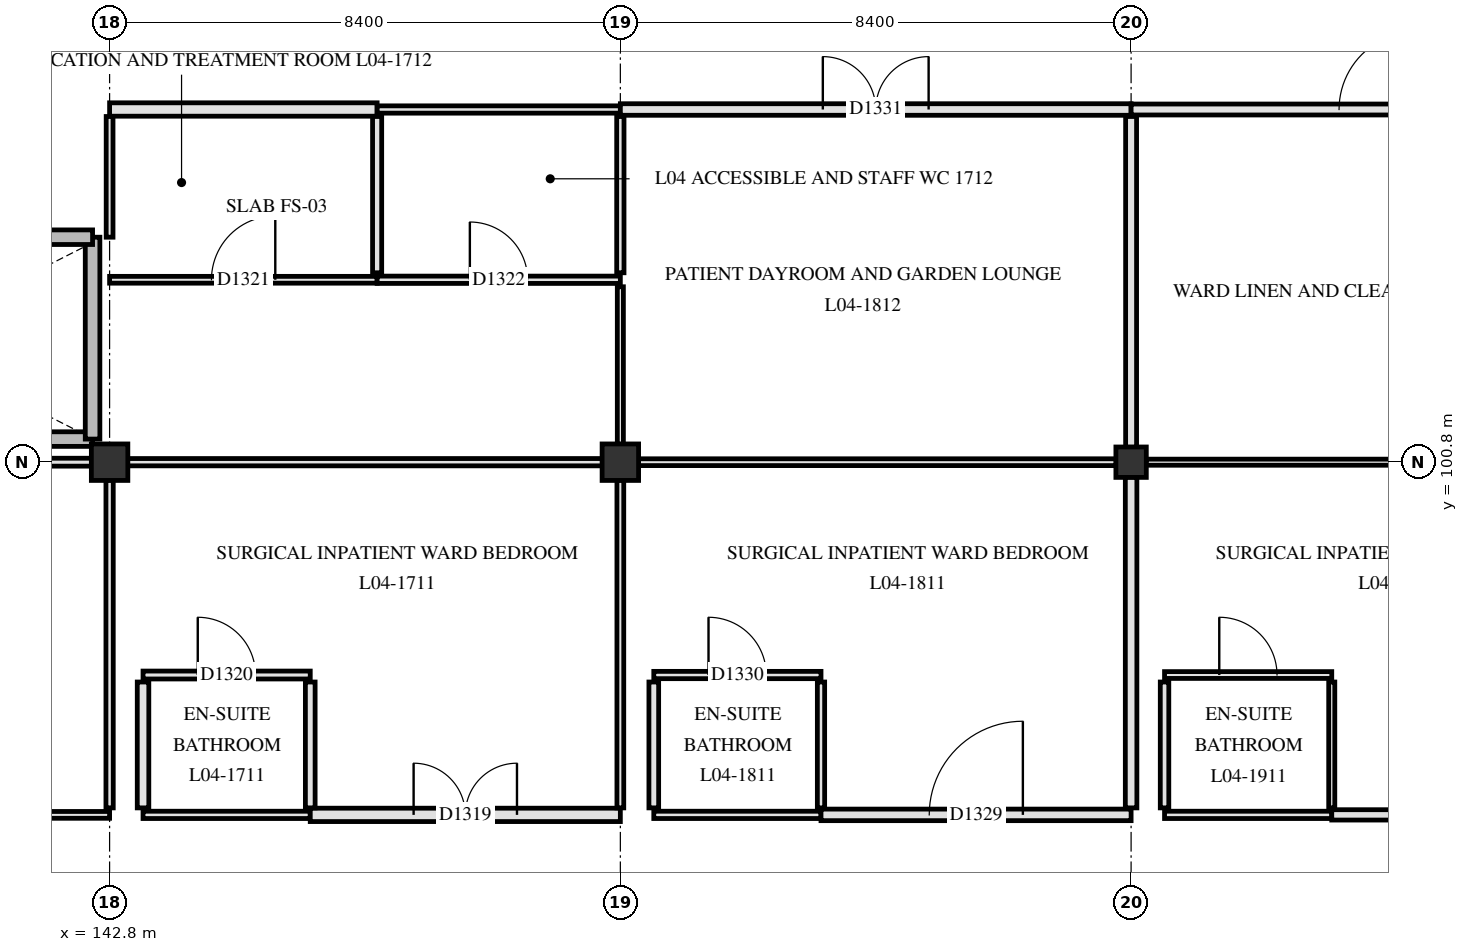
"""IFC4 building model, lengths in metres.
Left out: names, types, materials, properties, quantities, classifications, styles, units other than length and angle.
Written with IfcOpenShell. Run it as: python <this file> out.ifc"""

import sys

from ifc_helpers import new_model, si_unit, direction, frame, frame_2d, origin, origin_2d, place, context, subcontext, project, spatial, rectangle, extrude, element, fill, save


model = new_model("IFC4")
c1 = context("Model", 3, precision=1e-05, world=origin(), true_north=direction((0.0, 1.0)))
c2 = subcontext(c1, "Body", "Model", "MODEL_VIEW")
j1 = project(units=[si_unit("LENGTHUNIT", "METRE"), si_unit("PLANEANGLEUNIT", "RADIAN")], contexts=[c1])
p1 = place(None, origin())
s1 = spatial("IfcSite", under=j1, at=p1, CompositionType="ELEMENT")
p2 = place(p1, origin())
s2 = spatial("IfcBuilding", under=s1, at=p2, CompositionType="ELEMENT")
p3 = place(p2, frame((0.0, 0.0, 18.6)))
s3 = spatial("IfcBuildingStorey", under=s2, at=p3, CompositionType="ELEMENT", Elevation=18.6)
for number, where, z_axis, x_axis in (
    (1, (142.8, 100.8, 0.0), (0.0, 0.0, 1.0), (1.0, 0.0, 0.0)),
    (2, (151.2, 100.8, 0.0), (0.0, 0.0, 1.0), (1.0, 0.0, 0.0)),
):
    element("IfcColumn", number, at=place(p3, frame(where, z_axis=z_axis, x_axis=x_axis)), inside=s3, PredefinedType="COLUMN", context=c2, shape_type="SweptSolid", body=[
        extrude(rectangle(XDim=0.6, YDim=0.6, at=origin_2d()), origin(), (0.0, 0.0, 1.0), 3.9),
    ])
p4 = place(p3, frame((159.6, 100.8, 0.0), z_axis=(0.0, 0.0, 1.0), x_axis=(1.0, 0.0, 0.0)))
e3 = element("IfcColumn", 3, at=p4, inside=s3, PredefinedType="COLUMN", context=c2, shape_type="SweptSolid", body=[
    extrude(rectangle(XDim=0.5, YDim=0.5, at=origin_2d()), origin(), (0.0, 0.0, 1.0), 3.9),
])
p5 = place(p3, frame((134.7, 101.18, 0.0), z_axis=(0.0, 0.0, 1.0), x_axis=(1.0, 0.0, 0.0)))
e4 = element("IfcWall", 4, at=p5, inside=s3, PredefinedType="SHEAR", context=c2, shape_type="SweptSolid", body=[
    extrude(rectangle(XDim=7.82, YDim=0.24, at=frame_2d((3.91, 0.0))), origin(), (0.0, 0.0, 1.0), 3.62),
])
p6 = place(p3, frame((142.52, 101.18, 0.0), z_axis=(0.0, 0.0, 1.0), x_axis=(0.0, 1.0, 0.0)))
e5 = element("IfcWall", 5, at=p6, inside=s3, PredefinedType="SHEAR", context=c2, shape_type="SweptSolid", body=[
    extrude(rectangle(XDim=3.32, YDim=0.24, at=frame_2d((1.66, 0.0))), origin(), (0.0, 0.0, 1.0), 3.62),
])
p7 = place(p3, frame((134.7, 104.5, 0.0), z_axis=(0.0, 0.0, 1.0), x_axis=(1.0, 0.0, 0.0)))
e6 = element("IfcWall", 6, at=p7, inside=s3, PredefinedType="SHEAR", context=c2, shape_type="SweptSolid", body=[
    extrude(rectangle(XDim=7.82, YDim=0.24, at=frame_2d((3.91, 0.0))), origin(), (0.0, 0.0, 1.0), 3.62),
])
p8 = place(p7, frame((0.25, 0.0, 0.0)))
e7 = element("IfcOpeningElement", 7, at=p8, cuts=e6, PredefinedType="OPENING", context=c2, shape_type="SweptSolid", body=[
    extrude(rectangle(XDim=1.45, YDim=2.2, at=frame_2d((0.725, 1.1))), frame((0.0, 0.13, 0.0), z_axis=(0.0, -1.0, 0.0), x_axis=(1.0, 0.0, 0.0)), (0.0, 0.0, 1.0), 0.26),
])
p9 = place(p3, frame((137.7, 95.0, 0.0), z_axis=(0.0, 0.0, 1.0), x_axis=(1.0, 0.0, 0.0)))
e8 = element("IfcWall", 8, at=p9, inside=s3, PredefinedType="PARTITIONING", context=c2, shape_type="SweptSolid", body=[
    extrude(rectangle(XDim=5.1, YDim=0.112, at=frame_2d((2.55, 0.0))), origin(), (0.0, 0.0, 1.0), 3.26),
])
p10 = place(p9, frame((1.85, 0.0, 0.0)))
e9 = element("IfcOpeningElement", 9, at=p10, cuts=e8, PredefinedType="OPENING", context=c2, shape_type="SweptSolid", body=[
    extrude(rectangle(XDim=1.4, YDim=2.2, at=frame_2d((0.7, 1.1))), frame((0.0, 0.066, 0.0), z_axis=(0.0, -1.0, 0.0), x_axis=(1.0, 0.0, 0.0)), (0.0, 0.0, 1.0), 0.132),
])
p11 = place(p3, frame((143.35, 95.0, 0.0), z_axis=(0.0, 0.0, 1.0), x_axis=(1.0, 0.0, 0.0)))
e10 = element("IfcWall", 10, at=p11, inside=s3, PredefinedType="PARTITIONING", context=c2, shape_type="SweptSolid", body=[
    extrude(rectangle(XDim=2.75, YDim=0.12, at=frame_2d((1.375, 0.0))), origin(), (0.0, 0.0, 1.0), 3.61),
])
p12 = place(p3, frame((146.1, 95.0, 0.0), z_axis=(0.0, 0.0, 1.0), x_axis=(1.0, 0.0, 0.0)))
e11 = element("IfcWall", 11, at=p12, inside=s3, PredefinedType="PARTITIONING", context=c2, shape_type="SweptSolid", body=[
    extrude(rectangle(XDim=5.1, YDim=0.22, at=frame_2d((2.55, 0.0))), origin(), (0.0, 0.0, 1.0), 3.26),
])
p13 = place(p12, frame((1.7, 0.0, 0.0)))
e12 = element("IfcOpeningElement", 12, at=p13, cuts=e11, PredefinedType="OPENING", context=c2, shape_type="SweptSolid", body=[
    extrude(rectangle(XDim=1.7, YDim=2.25, at=frame_2d((0.85, 1.125))), frame((0.0, 0.12, 0.0), z_axis=(0.0, -1.0, 0.0), x_axis=(1.0, 0.0, 0.0)), (0.0, 0.0, 1.0), 0.24),
])
p14 = place(p3, frame((151.75, 95.0, 0.0), z_axis=(0.0, 0.0, 1.0), x_axis=(1.0, 0.0, 0.0)))
e13 = element("IfcWall", 13, at=p14, inside=s3, PredefinedType="PARTITIONING", context=c2, shape_type="SweptSolid", body=[
    extrude(rectangle(XDim=2.75, YDim=0.12, at=frame_2d((1.375, 0.0))), origin(), (0.0, 0.0, 1.0), 3.61),
])
p15 = place(p3, frame((154.5, 95.0, 0.0), z_axis=(0.0, 0.0, 1.0), x_axis=(1.0, 0.0, 0.0)))
e14 = element("IfcWall", 14, at=p15, inside=s3, PredefinedType="PARTITIONING", context=c2, shape_type="SweptSolid", body=[
    extrude(rectangle(XDim=5.1, YDim=0.19, at=frame_2d((2.55, 0.0))), origin(), (0.0, 0.0, 1.0), 3.25),
])
p16 = place(p15, frame((1.78, 0.0, 0.0)))
e15 = element("IfcOpeningElement", 15, at=p16, cuts=e14, PredefinedType="OPENING", context=c2, shape_type="SweptSolid", body=[
    extrude(rectangle(XDim=1.54, YDim=2.24, at=frame_2d((0.77, 1.12))), frame((0.0, 0.105, 0.0), z_axis=(0.0, -1.0, 0.0), x_axis=(1.0, 0.0, 0.0)), (0.0, 0.0, 1.0), 0.21),
])
p17 = place(p3, frame((160.15, 95.0, 0.0), z_axis=(0.0, 0.0, 1.0), x_axis=(1.0, 0.0, 0.0)))
e16 = element("IfcWall", 16, at=p17, inside=s3, PredefinedType="PARTITIONING", context=c2, shape_type="SweptSolid", body=[
    extrude(rectangle(XDim=2.75, YDim=0.12, at=frame_2d((1.375, 0.0))), origin(), (0.0, 0.0, 1.0), 3.61),
])
p18 = place(p3, frame((162.9, 95.0, 0.0), z_axis=(0.0, 0.0, 1.0), x_axis=(1.0, 0.0, 0.0)))
e17 = element("IfcWall", 17, at=p18, inside=s3, PredefinedType="PARTITIONING", context=c2, shape_type="SweptSolid", body=[
    extrude(rectangle(XDim=4.82, YDim=0.17, at=frame_2d((2.41, 0.0))), origin(), (0.0, 0.0, 1.0), 3.61),
])
p19 = place(p18, frame((1.85, 0.0, 0.0)))
e18 = element("IfcOpeningElement", 18, at=p19, cuts=e17, PredefinedType="OPENING", context=c2, shape_type="SweptSolid", body=[
    extrude(rectangle(XDim=1.12, YDim=2.18, at=frame_2d((0.56, 1.09))), frame((0.0, 0.095, 0.0), z_axis=(0.0, -1.0, 0.0), x_axis=(1.0, 0.0, 0.0)), (0.0, 0.0, 1.0), 0.19),
])
p20 = place(p3, frame((143.35, 97.3, 0.0), z_axis=(0.0, 0.0, 1.0), x_axis=(1.0, 0.0, 0.0)))
e19 = element("IfcWall", 19, at=p20, inside=s3, PredefinedType="PARTITIONING", context=c2, shape_type="SweptSolid", body=[
    extrude(rectangle(XDim=2.75, YDim=0.13, at=frame_2d((1.375, 0.0))), origin(), (0.0, 0.0, 1.0), 3.61),
])
p21 = place(p20, frame((0.9, 0.0, 0.0)))
e20 = element("IfcOpeningElement", 20, at=p21, cuts=e19, PredefinedType="OPENING", context=c2, shape_type="SweptSolid", body=[
    extrude(rectangle(XDim=0.95, YDim=2.1, at=frame_2d((0.475, 1.05))), frame((0.0, 0.075, 0.0), z_axis=(0.0, -1.0, 0.0), x_axis=(1.0, 0.0, 0.0)), (0.0, 0.0, 1.0), 0.15),
])
p22 = place(p3, frame((151.75, 97.3, 0.0), z_axis=(0.0, 0.0, 1.0), x_axis=(1.0, 0.0, 0.0)))
e21 = element("IfcWall", 21, at=p22, inside=s3, PredefinedType="PARTITIONING", context=c2, shape_type="SweptSolid", body=[
    extrude(rectangle(XDim=2.75, YDim=0.12, at=frame_2d((1.375, 0.0))), origin(), (0.0, 0.0, 1.0), 3.61),
])
p23 = place(p22, frame((0.9, 0.0, 0.0)))
e22 = element("IfcOpeningElement", 22, at=p23, cuts=e21, PredefinedType="OPENING", context=c2, shape_type="SweptSolid", body=[
    extrude(rectangle(XDim=0.95, YDim=2.1, at=frame_2d((0.475, 1.05))), frame((0.0, 0.07, 0.0), z_axis=(0.0, -1.0, 0.0), x_axis=(1.0, 0.0, 0.0)), (0.0, 0.0, 1.0), 0.14),
])
p24 = place(p3, frame((160.15, 97.3, 0.0), z_axis=(0.0, 0.0, 1.0), x_axis=(1.0, 0.0, 0.0)))
e23 = element("IfcWall", 23, at=p24, inside=s3, PredefinedType="PARTITIONING", context=c2, shape_type="SweptSolid", body=[
    extrude(rectangle(XDim=2.75, YDim=0.112, at=frame_2d((1.375, 0.0))), origin(), (0.0, 0.0, 1.0), 3.61),
])
p25 = place(p24, frame((0.9, 0.0, 0.0)))
e24 = element("IfcOpeningElement", 24, at=p25, cuts=e23, PredefinedType="OPENING", context=c2, shape_type="SweptSolid", body=[
    extrude(rectangle(XDim=0.95, YDim=2.1, at=frame_2d((0.475, 1.05))), frame((0.0, 0.066, 0.0), z_axis=(0.0, -1.0, 0.0), x_axis=(1.0, 0.0, 0.0)), (0.0, 0.0, 1.0), 0.132),
])
p26 = place(p3, frame((137.0, 100.8, 0.0), z_axis=(0.0, 0.0, 1.0), x_axis=(1.0, 0.0, 0.0)))
e25 = element("IfcWall", 25, at=p26, inside=s3, PredefinedType="PARTITIONING", context=c2, shape_type="SweptSolid", body=[
    extrude(rectangle(XDim=5.505, YDim=0.13, at=frame_2d((2.752, 0.0))), origin(), (0.0, 0.0, 1.0), 3.16),
])
p27 = place(p3, frame((143.095, 100.8, 0.0), z_axis=(0.0, 0.0, 1.0), x_axis=(1.0, 0.0, 0.0)))
e26 = element("IfcWall", 26, at=p27, inside=s3, PredefinedType="PARTITIONING", context=c2, shape_type="SweptSolid", body=[
    extrude(rectangle(XDim=7.81, YDim=0.12, at=frame_2d((3.905, 0.0))), origin(), (0.0, 0.0, 1.0), 3.16),
])
p28 = place(p3, frame((151.495, 100.8, 0.0), z_axis=(0.0, 0.0, 1.0), x_axis=(1.0, 0.0, 0.0)))
e27 = element("IfcWall", 27, at=p28, inside=s3, PredefinedType="PARTITIONING", context=c2, shape_type="SweptSolid", body=[
    extrude(rectangle(XDim=7.86, YDim=0.112, at=frame_2d((3.93, 0.0))), origin(), (0.0, 0.0, 1.0), 3.16),
])
p29 = place(p3, frame((159.845, 100.8, 0.0), z_axis=(0.0, 0.0, 1.0), x_axis=(1.0, 0.0, 0.0)))
e28 = element("IfcWall", 28, at=p29, inside=s3, PredefinedType="PARTITIONING", context=c2, shape_type="SweptSolid", body=[
    extrude(rectangle(XDim=7.91, YDim=0.1, at=frame_2d((3.955, 0.0))), origin(), (0.0, 0.0, 1.0), 3.15),
])
p30 = place(p3, frame((142.8, 103.8, 0.0), z_axis=(0.0, 0.0, 1.0), x_axis=(1.0, 0.0, 0.0)))
e29 = element("IfcWall", 29, at=p30, inside=s3, PredefinedType="PARTITIONING", context=c2, shape_type="SweptSolid", body=[
    extrude(rectangle(XDim=4.4, YDim=0.112, at=frame_2d((2.2, 0.0))), origin(), (0.0, 0.0, 1.0), 3.26),
])
p31 = place(p30, frame((1.675, 0.0, 0.0)))
e30 = element("IfcOpeningElement", 30, at=p31, cuts=e29, PredefinedType="OPENING", context=c2, shape_type="SweptSolid", body=[
    extrude(rectangle(XDim=1.05, YDim=2.15, at=frame_2d((0.525, 1.075))), frame((0.0, 0.066, 0.0), z_axis=(0.0, -1.0, 0.0), x_axis=(1.0, 0.0, 0.0)), (0.0, 0.0, 1.0), 0.132),
])
p32 = place(p3, frame((147.2, 103.8, 0.0), z_axis=(0.0, 0.0, 1.0), x_axis=(1.0, 0.0, 0.0)))
e31 = element("IfcWall", 31, at=p32, inside=s3, PredefinedType="PARTITIONING", context=c2, shape_type="SweptSolid", body=[
    extrude(rectangle(XDim=4.0, YDim=0.12, at=frame_2d((2.0, 0.0))), origin(), (0.0, 0.0, 1.0), 3.26),
])
p33 = place(p32, frame((1.525, 0.0, 0.0)))
e32 = element("IfcOpeningElement", 32, at=p33, cuts=e31, PredefinedType="OPENING", context=c2, shape_type="SweptSolid", body=[
    extrude(rectangle(XDim=0.95, YDim=2.1, at=frame_2d((0.475, 1.05))), frame((0.0, 0.07, 0.0), z_axis=(0.0, -1.0, 0.0), x_axis=(1.0, 0.0, 0.0)), (0.0, 0.0, 1.0), 0.14),
])
p34 = place(p3, frame((142.8, 106.6, 0.0), z_axis=(0.0, 0.0, 1.0), x_axis=(1.0, 0.0, 0.0)))
e33 = element("IfcWall", 33, at=p34, inside=s3, PredefinedType="PARTITIONING", context=c2, shape_type="SweptSolid", body=[
    extrude(rectangle(XDim=4.4, YDim=0.22, at=frame_2d((2.2, 0.0))), origin(), (0.0, 0.0, 1.0), 3.26),
])
p35 = place(p3, frame((147.2, 106.6, 0.0), z_axis=(0.0, 0.0, 1.0), x_axis=(1.0, 0.0, 0.0)))
e34 = element("IfcWall", 34, at=p35, inside=s3, PredefinedType="PARTITIONING", context=c2, shape_type="SweptSolid", body=[
    extrude(rectangle(XDim=4.0, YDim=0.12, at=frame_2d((2.0, 0.0))), origin(), (0.0, 0.0, 1.0), 3.26),
])
p36 = place(p3, frame((151.2, 106.6, 0.0), z_axis=(0.0, 0.0, 1.0), x_axis=(1.0, 0.0, 0.0)))
e35 = element("IfcWall", 35, at=p36, inside=s3, PredefinedType="PARTITIONING", context=c2, shape_type="SweptSolid", body=[
    extrude(rectangle(XDim=8.4, YDim=0.19, at=frame_2d((4.2, 0.0))), origin(), (0.0, 0.0, 1.0), 3.25),
])
p37 = place(p36, frame((3.33, 0.0, 0.0)))
e36 = element("IfcOpeningElement", 36, at=p37, cuts=e35, PredefinedType="OPENING", context=c2, shape_type="SweptSolid", body=[
    extrude(rectangle(XDim=1.74, YDim=2.24, at=frame_2d((0.87, 1.12))), frame((0.0, 0.105, 0.0), z_axis=(0.0, -1.0, 0.0), x_axis=(1.0, 0.0, 0.0)), (0.0, 0.0, 1.0), 0.21),
])
p38 = place(p3, frame((159.6, 106.6, 0.0), z_axis=(0.0, 0.0, 1.0), x_axis=(1.0, 0.0, 0.0)))
e37 = element("IfcWall", 37, at=p38, inside=s3, PredefinedType="PARTITIONING", context=c2, shape_type="SweptSolid", body=[
    extrude(rectangle(XDim=8.12, YDim=0.18, at=frame_2d((4.06, 0.0))), origin(), (0.0, 0.0, 1.0), 3.25),
])
p39 = place(p38, frame((3.42, 0.0, 0.0)))
e38 = element("IfcOpeningElement", 38, at=p39, cuts=e37, PredefinedType="OPENING", context=c2, shape_type="SweptSolid", body=[
    extrude(rectangle(XDim=1.28, YDim=2.18, at=frame_2d((0.64, 1.09))), frame((0.0, 0.1, 0.0), z_axis=(0.0, -1.0, 0.0), x_axis=(1.0, 0.0, 0.0)), (0.0, 0.0, 1.0), 0.2),
])
p40 = place(p3, frame((142.8, 95.115, 0.0), z_axis=(0.0, 0.0, 1.0), x_axis=(0.0, 1.0, 0.0)))
e39 = element("IfcWall", 39, at=p40, inside=s3, PredefinedType="PARTITIONING", context=c2, shape_type="SweptSolid", body=[
    extrude(rectangle(XDim=5.39, YDim=0.12, at=frame_2d((2.695, 0.0))), origin(), (0.0, 0.0, 1.0), 3.26),
])
p41 = place(p3, frame((142.8, 104.5, 0.0), z_axis=(0.0, 0.0, 1.0), x_axis=(0.0, 1.0, 0.0)))
e40 = element("IfcWall", 40, at=p41, inside=s3, PredefinedType="PARTITIONING", context=c2, shape_type="SweptSolid", body=[
    extrude(rectangle(XDim=1.985, YDim=0.112, at=frame_2d((0.993, 0.0))), origin(), (0.0, 0.0, 1.0), 3.26),
])
p42 = place(p3, frame((143.35, 95.115, 0.0), z_axis=(0.0, 0.0, 1.0), x_axis=(0.0, 1.0, 0.0)))
e41 = element("IfcWall", 41, at=p42, inside=s3, PredefinedType="PARTITIONING", context=c2, shape_type="SweptSolid", body=[
    extrude(rectangle(XDim=2.07, YDim=0.19, at=frame_2d((1.035, 0.0))), origin(), (0.0, 0.0, 1.0), 3.31),
])
p43 = place(p3, frame((146.1, 95.115, 0.0), z_axis=(0.0, 0.0, 1.0), x_axis=(0.0, 1.0, 0.0)))
e42 = element("IfcWall", 42, at=p43, inside=s3, PredefinedType="PARTITIONING", context=c2, shape_type="SweptSolid", body=[
    extrude(rectangle(XDim=2.07, YDim=0.16, at=frame_2d((1.035, 0.0))), origin(), (0.0, 0.0, 1.0), 3.31),
])
p44 = place(p3, frame((147.2, 103.915, 0.0), z_axis=(0.0, 0.0, 1.0), x_axis=(0.0, 1.0, 0.0)))
e43 = element("IfcWall", 43, at=p44, inside=s3, PredefinedType="PARTITIONING", context=c2, shape_type="SweptSolid", body=[
    extrude(rectangle(XDim=2.57, YDim=0.15, at=frame_2d((1.285, 0.0))), origin(), (0.0, 0.0, 1.0), 3.31),
])
p45 = place(p3, frame((151.2, 95.115, 0.0), z_axis=(0.0, 0.0, 1.0), x_axis=(0.0, 1.0, 0.0)))
e44 = element("IfcWall", 44, at=p45, inside=s3, PredefinedType="PARTITIONING", context=c2, shape_type="SweptSolid", body=[
    extrude(rectangle(XDim=5.39, YDim=0.112, at=frame_2d((2.695, 0.0))), origin(), (0.0, 0.0, 1.0), 3.26),
])
p46 = place(p3, frame((151.2, 101.095, 0.0), z_axis=(0.0, 0.0, 1.0), x_axis=(0.0, 1.0, 0.0)))
e45 = element("IfcWall", 45, at=p46, inside=s3, PredefinedType="PARTITIONING", context=c2, shape_type="SweptSolid", body=[
    extrude(rectangle(XDim=2.59, YDim=0.1, at=frame_2d((1.295, 0.0))), origin(), (0.0, 0.0, 1.0), 3.26),
])
p47 = place(p3, frame((151.2, 103.915, 0.0), z_axis=(0.0, 0.0, 1.0), x_axis=(0.0, 1.0, 0.0)))
e46 = element("IfcWall", 46, at=p47, inside=s3, PredefinedType="PARTITIONING", context=c2, shape_type="SweptSolid", body=[
    extrude(rectangle(XDim=2.57, YDim=0.12, at=frame_2d((1.285, 0.0))), origin(), (0.0, 0.0, 1.0), 3.26),
])
p48 = place(p3, frame((151.75, 95.115, 0.0), z_axis=(0.0, 0.0, 1.0), x_axis=(0.0, 1.0, 0.0)))
e47 = element("IfcWall", 47, at=p48, inside=s3, PredefinedType="PARTITIONING", context=c2, shape_type="SweptSolid", body=[
    extrude(rectangle(XDim=2.07, YDim=0.16, at=frame_2d((1.035, 0.0))), origin(), (0.0, 0.0, 1.0), 3.31),
])
p49 = place(p3, frame((154.5, 95.115, 0.0), z_axis=(0.0, 0.0, 1.0), x_axis=(0.0, 1.0, 0.0)))
e48 = element("IfcWall", 48, at=p49, inside=s3, PredefinedType="PARTITIONING", context=c2, shape_type="SweptSolid", body=[
    extrude(rectangle(XDim=2.07, YDim=0.12, at=frame_2d((1.035, 0.0))), origin(), (0.0, 0.0, 1.0), 3.31),
])
p50 = place(p3, frame((159.6, 95.115, 0.0), z_axis=(0.0, 0.0, 1.0), x_axis=(0.0, 1.0, 0.0)))
e49 = element("IfcWall", 49, at=p50, inside=s3, PredefinedType="PARTITIONING", context=c2, shape_type="SweptSolid", body=[
    extrude(rectangle(XDim=5.44, YDim=0.19, at=frame_2d((2.72, 0.0))), origin(), (0.0, 0.0, 1.0), 3.25),
])
p51 = place(p3, frame((159.6, 101.045, 0.0), z_axis=(0.0, 0.0, 1.0), x_axis=(0.0, 1.0, 0.0)))
e50 = element("IfcWall", 50, at=p51, inside=s3, PredefinedType="PARTITIONING", context=c2, shape_type="SweptSolid", body=[
    extrude(rectangle(XDim=5.44, YDim=0.18, at=frame_2d((2.72, 0.0))), origin(), (0.0, 0.0, 1.0), 3.25),
])
p52 = place(p3, frame((160.15, 95.115, 0.0), z_axis=(0.0, 0.0, 1.0), x_axis=(0.0, 1.0, 0.0)))
e51 = element("IfcWall", 51, at=p52, inside=s3, PredefinedType="PARTITIONING", context=c2, shape_type="SweptSolid", body=[
    extrude(rectangle(XDim=2.07, YDim=0.14, at=frame_2d((1.035, 0.0))), origin(), (0.0, 0.0, 1.0), 3.3),
])
p53 = place(p3, frame((162.9, 95.115, 0.0), z_axis=(0.0, 0.0, 1.0), x_axis=(0.0, 1.0, 0.0)))
e52 = element("IfcWall", 52, at=p53, inside=s3, PredefinedType="PARTITIONING", context=c2, shape_type="SweptSolid", body=[
    extrude(rectangle(XDim=2.07, YDim=0.1, at=frame_2d((1.035, 0.0))), origin(), (0.0, 0.0, 1.0), 3.3),
])
p54 = place(p13, origin())
e53 = element("IfcDoor", 53, at=p54, inside=s3, OperationType="DOUBLE_SWING_RIGHT", PredefinedType="DOOR", context=c2, shape_type="SweptSolid", body=[
    extrude(rectangle(XDim=1.7, YDim=2.25, at=frame_2d((0.85, 1.125))), frame((0.0, 0.025, 0.0), z_axis=(0.0, -1.0, 0.0), x_axis=(1.0, 0.0, 0.0)), (0.0, 0.0, 1.0), 0.05),
])
fill(e12, e53)
p55 = place(p21, origin())
e54 = element("IfcDoor", 54, at=p55, inside=s3, OperationType="SINGLE_SWING_LEFT", PredefinedType="DOOR", context=c2, shape_type="SweptSolid", body=[
    extrude(rectangle(XDim=0.95, YDim=2.1, at=frame_2d((0.475, 1.05))), frame((0.0, 0.025, 0.0), z_axis=(0.0, -1.0, 0.0), x_axis=(1.0, 0.0, 0.0)), (0.0, 0.0, 1.0), 0.05),
])
fill(e20, e54)
p56 = place(p31, origin())
e55 = element("IfcDoor", 55, at=p56, inside=s3, OperationType="SINGLE_SWING_RIGHT", PredefinedType="DOOR", context=c2, shape_type="SweptSolid", body=[
    extrude(rectangle(XDim=1.05, YDim=2.15, at=frame_2d((0.525, 1.075))), frame((0.0, 0.025, 0.0), z_axis=(0.0, -1.0, 0.0), x_axis=(1.0, 0.0, 0.0)), (0.0, 0.0, 1.0), 0.05),
])
fill(e30, e55)
p57 = place(p33, origin())
e56 = element("IfcDoor", 56, at=p57, inside=s3, OperationType="SINGLE_SWING_LEFT", PredefinedType="DOOR", context=c2, shape_type="SweptSolid", body=[
    extrude(rectangle(XDim=0.95, YDim=2.1, at=frame_2d((0.475, 1.05))), frame((0.0, 0.025, 0.0), z_axis=(0.0, -1.0, 0.0), x_axis=(1.0, 0.0, 0.0)), (0.0, 0.0, 1.0), 0.05),
])
fill(e32, e56)
p58 = place(p16, origin())
e57 = element("IfcDoor", 57, at=p58, inside=s3, OperationType="SINGLE_SWING_RIGHT", PredefinedType="DOOR", context=c2, shape_type="SweptSolid", body=[
    extrude(rectangle(XDim=1.54, YDim=2.24, at=frame_2d((0.77, 1.12))), frame((0.0, 0.025, 0.0), z_axis=(0.0, -1.0, 0.0), x_axis=(1.0, 0.0, 0.0)), (0.0, 0.0, 1.0), 0.05),
])
fill(e15, e57)
p59 = place(p23, origin())
e58 = element("IfcDoor", 58, at=p59, inside=s3, OperationType="SINGLE_SWING_LEFT", PredefinedType="DOOR", context=c2, shape_type="SweptSolid", body=[
    extrude(rectangle(XDim=0.95, YDim=2.1, at=frame_2d((0.475, 1.05))), frame((0.0, 0.025, 0.0), z_axis=(0.0, -1.0, 0.0), x_axis=(1.0, 0.0, 0.0)), (0.0, 0.0, 1.0), 0.05),
])
fill(e22, e58)
p60 = place(p37, origin())
e59 = element("IfcDoor", 59, at=p60, inside=s3, OperationType="DOUBLE_SWING_RIGHT", PredefinedType="DOOR", context=c2, shape_type="SweptSolid", body=[
    extrude(rectangle(XDim=1.74, YDim=2.24, at=frame_2d((0.87, 1.12))), frame((0.0, 0.025, 0.0), z_axis=(0.0, -1.0, 0.0), x_axis=(1.0, 0.0, 0.0)), (0.0, 0.0, 1.0), 0.05),
])
fill(e36, e59)
p61 = place(p25, origin())
e60 = element("IfcDoor", 60, at=p61, inside=s3, OperationType="SINGLE_SWING_LEFT", PredefinedType="DOOR", context=c2, shape_type="SweptSolid", body=[
    extrude(rectangle(XDim=0.95, YDim=2.1, at=frame_2d((0.475, 1.05))), frame((0.0, 0.025, 0.0), z_axis=(0.0, -1.0, 0.0), x_axis=(1.0, 0.0, 0.0)), (0.0, 0.0, 1.0), 0.05),
])
fill(e24, e60)
p62 = place(p39, origin())
e61 = element("IfcDoor", 61, at=p62, inside=s3, OperationType="SINGLE_SWING_RIGHT", PredefinedType="DOOR", context=c2, shape_type="SweptSolid", body=[
    extrude(rectangle(XDim=1.28, YDim=2.18, at=frame_2d((0.64, 1.09))), frame((0.0, 0.025, 0.0), z_axis=(0.0, -1.0, 0.0), x_axis=(1.0, 0.0, 0.0)), (0.0, 0.0, 1.0), 0.05),
])
fill(e38, e61)
save(model, sys.argv[1])
